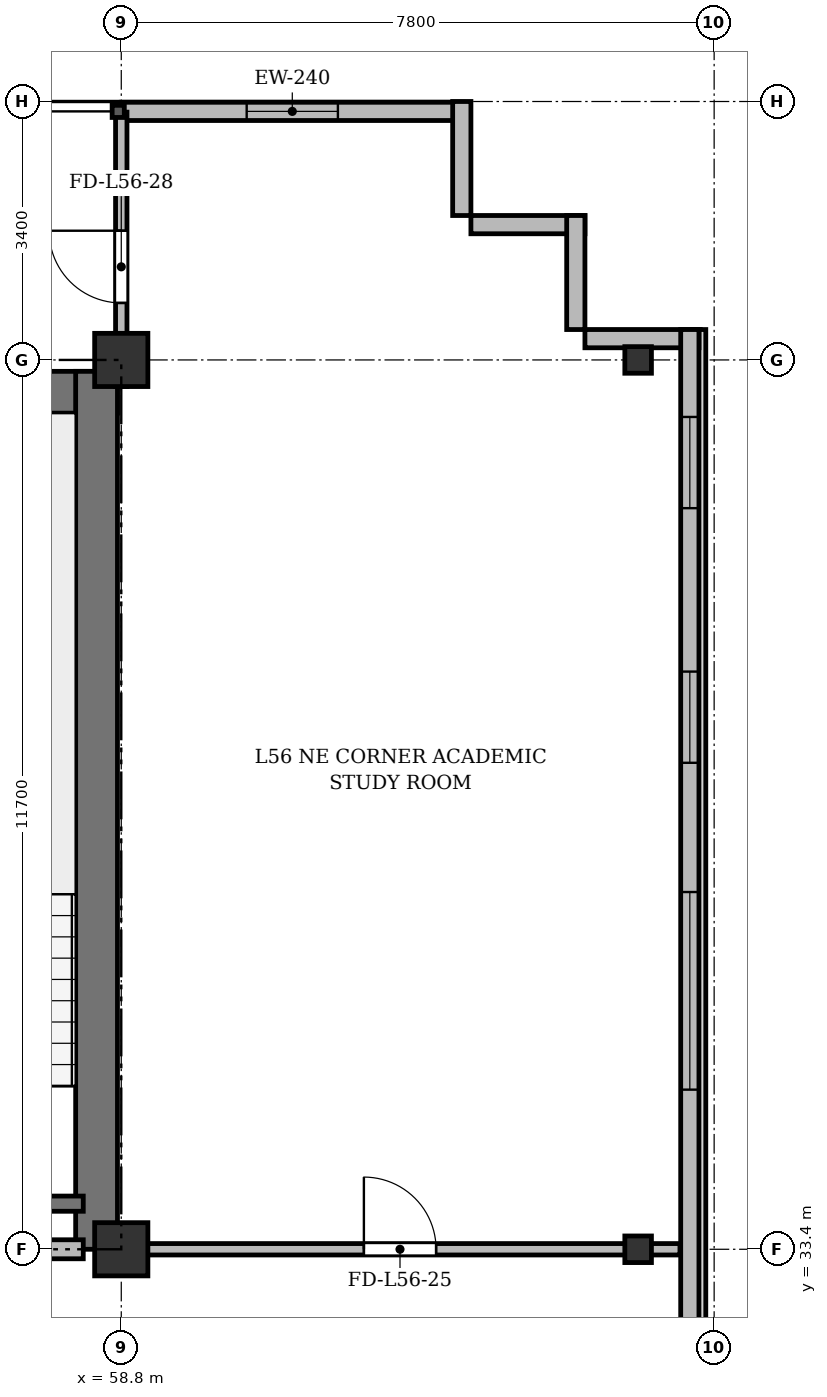
"""IFC4 building model, lengths in metres.
Left out: names, types, materials, properties, quantities, classifications, styles, units other than length and angle.
Written with IfcOpenShell. Run it as: python <this file> out.ifc"""

import sys

from ifc_helpers import new_model, si_unit, direction, frame, frame_2d, origin, origin_2d, place, context, subcontext, project, spatial, rectangle, i_section, extrude, source, transform, mapped, element, fill, save


model = new_model("IFC4")
c1 = context("Model", 3, precision=1e-05, world=origin(), true_north=direction((0.0, 1.0)))
c2 = subcontext(c1, "Body", "Model", "MODEL_VIEW")
j1 = project(units=[si_unit("LENGTHUNIT", "METRE"), si_unit("PLANEANGLEUNIT", "RADIAN")], contexts=[c1])
p1 = place(None, origin())
s1 = spatial("IfcSite", under=j1, at=p1, CompositionType="ELEMENT")
p2 = place(p1, origin())
s2 = spatial("IfcBuilding", under=s1, at=p2, CompositionType="ELEMENT")
p3 = place(p2, frame((0.0, 0.0, 215.7)))
s3 = spatial("IfcBuildingStorey", under=s2, at=p3, CompositionType="ELEMENT", Elevation=215.7)
m1 = source(origin(), c2, "Body", "SweptSolid", [
    extrude(rectangle(XDim=0.7, YDim=0.7, at=origin_2d()), origin(), (0.0, 0.0, 1.0), 3.6),
])
for number, where, z_axis, x_axis in (
    (1, (58.8, 33.4, 0.0), (0.0, 0.0, 1.0), (1.0, 0.0, 0.0)),
    (2, (58.8, 45.1, 0.0), (0.0, 0.0, 1.0), (1.0, 0.0, 0.0)),
):
    element("IfcColumn", number, at=place(p3, frame(where, z_axis=z_axis, x_axis=x_axis)), inside=s3, PredefinedType="COLUMN", context=c2, shape_type="MappedRepresentation", body=[
        mapped(m1, transform((0.0, 0.0, 0.0), x_axis=(1.0, 0.0, 0.0), y_axis=(0.0, 1.0, 0.0), z_axis=(0.0, 0.0, 1.0), scale=1.0)),
    ])
m2 = source(origin(), c2, "Body", "SweptSolid", [
    extrude(i_section(OverallWidth=0.35, OverallDepth=0.35, WebThickness=0.018, FlangeThickness=0.028, at=origin_2d()), origin(), (0.0, 0.0, 1.0), 3.6),
])
for number, where, z_axis, x_axis in (
    (3, (65.6, 33.4, 0.0), (0.0, 0.0, 1.0), (1.0, 0.0, 0.0)),
    (4, (65.6, 45.1, 0.0), (0.0, 0.0, 1.0), (1.0, 0.0, 0.0)),
):
    element("IfcColumn", number, at=place(p3, frame(where, z_axis=z_axis, x_axis=x_axis)), inside=s3, PredefinedType="COLUMN", context=c2, shape_type="MappedRepresentation", body=[
        mapped(m2, transform((0.0, 0.0, 0.0), x_axis=(1.0, 0.0, 0.0), y_axis=(0.0, 1.0, 0.0), z_axis=(0.0, 0.0, 1.0), scale=1.0)),
    ])
p4 = place(p3, frame((58.8, 48.37, 0.0), z_axis=(0.0, 0.0, 1.0), x_axis=(1.0, 0.0, 0.0)))
e5 = element("IfcWall", 5, at=p4, inside=s3, PredefinedType="SOLIDWALL", context=c2, shape_type="SweptSolid", body=[
    extrude(rectangle(XDim=4.5, YDim=0.24, at=frame_2d((2.25, 0.0))), origin(), (0.0, 0.0, 1.0), 3.36),
])
p5 = place(p4, frame((1.65, 0.0, 0.9)))
e6 = element("IfcOpeningElement", 6, at=p5, cuts=e5, PredefinedType="OPENING", context=c2, shape_type="SweptSolid", body=[
    extrude(rectangle(XDim=1.2, YDim=1.65, at=frame_2d((0.6, 0.825))), frame((0.0, 0.13, 0.0), z_axis=(0.0, -1.0, 0.0), x_axis=(1.0, 0.0, 0.0)), (0.0, 0.0, 1.0), 0.26),
])
for number, where, z_axis, x_axis in (
    (7, (63.28, 48.5, 0.0), (0.0, 0.0, 1.0), (0.0, -1.0, 0.0)),
    (8, (63.4, 46.88, 0.0), (0.0, 0.0, 1.0), (1.0, 0.0, 0.0)),
    (9, (64.78, 47.0, 0.0), (0.0, 0.0, 1.0), (0.0, -1.0, 0.0)),
    (10, (64.9, 45.38, 0.0), (0.0, 0.0, 1.0), (1.0, 0.0, 0.0)),
):
    element("IfcWall", number, at=place(p3, frame(where, z_axis=z_axis, x_axis=x_axis)), inside=s3, PredefinedType="SOLIDWALL", context=c2, shape_type="SweptSolid", body=[
        extrude(rectangle(XDim=1.5, YDim=0.24, at=frame_2d((0.75, 0.0))), origin(), (0.0, 0.0, 1.0), 3.36),
    ])
p6 = place(p3, frame((66.28, 45.5, 0.0), z_axis=(0.0, 0.0, 1.0), x_axis=(0.0, -1.0, 0.0)))
e11 = element("IfcWall", 11, at=p6, inside=s3, PredefinedType="SOLIDWALL", context=c2, shape_type="SweptSolid", body=[
    extrude(rectangle(XDim=39.1, YDim=0.24, at=frame_2d((19.55, 0.0))), origin(), (0.0, 0.0, 1.0), 3.36),
])
p7 = place(p6, frame((36.45, 0.0, 0.92)))
e12 = element("IfcOpeningElement", 12, at=p7, cuts=e11, PredefinedType="OPENING", context=c2, shape_type="SweptSolid", body=[
    extrude(rectangle(XDim=1.2, YDim=1.65, at=frame_2d((0.6, 0.825))), frame((0.0, 0.13, 0.0), z_axis=(0.0, -1.0, 0.0), x_axis=(1.0, 0.0, 0.0)), (0.0, 0.0, 1.0), 0.26),
])
p8 = place(p6, frame((32.8, 0.0, 0.92)))
e13 = element("IfcOpeningElement", 13, at=p8, cuts=e11, PredefinedType="OPENING", context=c2, shape_type="SweptSolid", body=[
    extrude(rectangle(XDim=2.6, YDim=1.9, at=frame_2d((1.3, 0.95))), frame((0.0, 0.13, 0.0), z_axis=(0.0, -1.0, 0.0), x_axis=(1.0, 0.0, 0.0)), (0.0, 0.0, 1.0), 0.26),
])
p9 = place(p6, frame((28.6, 0.0, 0.92)))
e14 = element("IfcOpeningElement", 14, at=p9, cuts=e11, PredefinedType="OPENING", context=c2, shape_type="SweptSolid", body=[
    extrude(rectangle(XDim=2.6, YDim=1.9, at=frame_2d((1.3, 0.95))), frame((0.0, 0.13, 0.0), z_axis=(0.0, -1.0, 0.0), x_axis=(1.0, 0.0, 0.0)), (0.0, 0.0, 1.0), 0.26),
])
p10 = place(p6, frame((21.4, 0.0, 0.92)))
e15 = element("IfcOpeningElement", 15, at=p10, cuts=e11, PredefinedType="OPENING", context=c2, shape_type="SweptSolid", body=[
    extrude(rectangle(XDim=2.6, YDim=1.9, at=frame_2d((1.3, 0.95))), frame((0.0, 0.13, 0.0), z_axis=(0.0, -1.0, 0.0), x_axis=(1.0, 0.0, 0.0)), (0.0, 0.0, 1.0), 0.26),
])
p11 = place(p6, frame((7.4, 0.0, 0.92)))
e16 = element("IfcOpeningElement", 16, at=p11, cuts=e11, PredefinedType="OPENING", context=c2, shape_type="SweptSolid", body=[
    extrude(rectangle(XDim=2.6, YDim=1.9, at=frame_2d((1.3, 0.95))), frame((0.0, 0.13, 0.0), z_axis=(0.0, -1.0, 0.0), x_axis=(1.0, 0.0, 0.0)), (0.0, 0.0, 1.0), 0.26),
])
p12 = place(p6, frame((4.5, 0.0, 0.92)))
e17 = element("IfcOpeningElement", 17, at=p12, cuts=e11, PredefinedType="OPENING", context=c2, shape_type="SweptSolid", body=[
    extrude(rectangle(XDim=1.2, YDim=1.65, at=frame_2d((0.6, 0.825))), frame((0.0, 0.13, 0.0), z_axis=(0.0, -1.0, 0.0), x_axis=(1.0, 0.0, 0.0)), (0.0, 0.0, 1.0), 0.26),
])
p13 = place(p6, frame((1.15, 0.0, 0.92)))
e18 = element("IfcOpeningElement", 18, at=p13, cuts=e11, PredefinedType="OPENING", context=c2, shape_type="SweptSolid", body=[
    extrude(rectangle(XDim=1.2, YDim=1.65, at=frame_2d((0.6, 0.825))), frame((0.0, 0.13, 0.0), z_axis=(0.0, -1.0, 0.0), x_axis=(1.0, 0.0, 0.0)), (0.0, 0.0, 1.0), 0.26),
])
p14 = place(p3, frame((15.65, 44.675, 0.0), z_axis=(0.0, 0.0, 1.0), x_axis=(1.0, 0.0, 0.0)))
e19 = element("IfcWall", 19, at=p14, inside=s3, PredefinedType="SHEAR", context=c2, shape_type="SweptSolid", body=[
    extrude(rectangle(XDim=43.1, YDim=0.55, at=frame_2d((21.55, 0.0))), origin(), (0.0, 0.0, 1.0), 3.36),
])
p15 = place(p3, frame((58.475, 33.4, 0.0), z_axis=(0.0, 0.0, 1.0), x_axis=(0.0, 1.0, 0.0)))
e20 = element("IfcWall", 20, at=p15, inside=s3, PredefinedType="SHEAR", context=c2, shape_type="SweptSolid", body=[
    extrude(rectangle(XDim=11.55, YDim=0.55, at=frame_2d((5.775, 0.0))), origin(), (0.0, 0.0, 1.0), 3.36),
])
p16 = place(p3, frame((54.9, 34.0, 0.0), z_axis=(0.0, 0.0, 1.0), x_axis=(1.0, 0.0, 0.0)))
e21 = element("IfcWall", 21, at=p16, inside=s3, PredefinedType="SHEAR", context=c2, shape_type="SweptSolid", body=[
    extrude(rectangle(XDim=3.4, YDim=0.2, at=frame_2d((1.7, 0.0))), origin(), (0.0, 0.0, 1.0), 3.36),
])
p17 = place(p3, frame((47.15, 33.4, 0.0), z_axis=(0.0, 0.0, 1.0), x_axis=(1.0, 0.0, 0.0)))
e22 = element("IfcWall", 22, at=p17, inside=s3, PredefinedType="PARTITIONING", context=c2, shape_type="SweptSolid", body=[
    extrude(rectangle(XDim=11.15, YDim=0.25, at=frame_2d((5.575, 0.0))), origin(), (0.0, 0.0, 1.0), 2.91),
])
p18 = place(p17, frame((0.7, 0.0, 0.0)))
e23 = element("IfcOpeningElement", 23, at=p18, cuts=e22, PredefinedType="OPENING", context=c2, shape_type="SweptSolid", body=[
    extrude(rectangle(XDim=0.95, YDim=2.15, at=frame_2d((0.475, 1.075))), frame((0.0, 0.135, 0.0), z_axis=(0.0, -1.0, 0.0), x_axis=(1.0, 0.0, 0.0)), (0.0, 0.0, 1.0), 0.27),
])
p19 = place(p17, frame((6.0, 0.0, 0.0)))
e24 = element("IfcOpeningElement", 24, at=p19, cuts=e22, PredefinedType="OPENING", context=c2, shape_type="SweptSolid", body=[
    extrude(rectangle(XDim=1.2, YDim=2.15, at=frame_2d((0.6, 1.075))), frame((0.0, 0.135, 0.0), z_axis=(0.0, -1.0, 0.0), x_axis=(1.0, 0.0, 0.0)), (0.0, 0.0, 1.0), 0.27),
])
p20 = place(p3, frame((58.8, 33.4, 0.0), z_axis=(0.0, 0.0, 1.0), x_axis=(1.0, 0.0, 0.0)))
e25 = element("IfcWall", 25, at=p20, inside=s3, PredefinedType="PARTITIONING", context=c2, shape_type="SweptSolid", body=[
    extrude(rectangle(XDim=7.35, YDim=0.15, at=frame_2d((3.675, 0.0))), origin(), (0.0, 0.0, 1.0), 2.91),
])
p21 = place(p20, frame((3.192, 0.0, 0.0)))
e26 = element("IfcOpeningElement", 26, at=p21, cuts=e25, PredefinedType="OPENING", context=c2, shape_type="SweptSolid", body=[
    extrude(rectangle(XDim=0.95, YDim=2.15, at=frame_2d((0.475, 1.075))), frame((0.0, 0.085, 0.0), z_axis=(0.0, -1.0, 0.0), x_axis=(1.0, 0.0, 0.0)), (0.0, 0.0, 1.0), 0.17),
])
p22 = place(p3, frame((58.8, 44.75, 0.0), z_axis=(0.0, 0.0, 1.0), x_axis=(0.0, 1.0, 0.0)))
e27 = element("IfcWall", 27, at=p22, inside=s3, PredefinedType="PARTITIONING", context=c2, shape_type="SweptSolid", body=[
    extrude(rectangle(XDim=3.61, YDim=0.15, at=frame_2d((1.805, 0.0))), origin(), (0.0, 0.0, 1.0), 2.86),
])
p23 = place(p22, frame((1.1, 0.0, 0.0)))
e28 = element("IfcOpeningElement", 28, at=p23, cuts=e27, PredefinedType="OPENING", context=c2, shape_type="SweptSolid", body=[
    extrude(rectangle(XDim=0.95, YDim=2.15, at=frame_2d((0.475, 1.075))), frame((0.0, 0.085, 0.0), z_axis=(0.0, -1.0, 0.0), x_axis=(1.0, 0.0, 0.0)), (0.0, 0.0, 1.0), 0.17),
])
m3 = source(origin(), c2, "Body", "SweptSolid", [
    extrude(rectangle(XDim=1.2, YDim=1.65, at=frame_2d((0.6, 0.825))), frame((0.0, 0.03, 0.0), z_axis=(0.0, -1.0, 0.0), x_axis=(1.0, 0.0, 0.0)), (0.0, 0.0, 1.0), 0.06),
])
p24 = place(p5, origin())
e29 = element("IfcWindow", 29, at=p24, inside=s3, PartitioningType="SINGLE_PANEL", PredefinedType="WINDOW", context=c2, shape_type="MappedRepresentation", body=[
    mapped(m3, transform((0.0, 0.0, 0.0), x_axis=(1.0, 0.0, 0.0), y_axis=(0.0, 1.0, 0.0), z_axis=(0.0, 0.0, 1.0), scale=1.0)),
])
fill(e6, e29)
m4 = source(origin(), c2, "Body", "SweptSolid", [
    extrude(rectangle(XDim=2.6, YDim=1.9, at=frame_2d((1.3, 0.95))), frame((0.0, 0.03, 0.0), z_axis=(0.0, -1.0, 0.0), x_axis=(1.0, 0.0, 0.0)), (0.0, 0.0, 1.0), 0.06),
])
p25 = place(p11, origin())
e30 = element("IfcWindow", 30, at=p25, inside=s3, PartitioningType="SINGLE_PANEL", PredefinedType="WINDOW", context=c2, shape_type="MappedRepresentation", body=[
    mapped(m4, transform((0.0, 0.0, 0.0), x_axis=(1.0, 0.0, 0.0), y_axis=(0.0, 1.0, 0.0), z_axis=(0.0, 0.0, 1.0), scale=1.0)),
])
fill(e16, e30)
p26 = place(p12, origin())
e31 = element("IfcWindow", 31, at=p26, inside=s3, PartitioningType="SINGLE_PANEL", PredefinedType="WINDOW", context=c2, shape_type="MappedRepresentation", body=[
    mapped(m3, transform((0.0, 0.0, 0.0), x_axis=(1.0, 0.0, 0.0), y_axis=(0.0, 1.0, 0.0), z_axis=(0.0, 0.0, 1.0), scale=1.0)),
])
fill(e17, e31)
p27 = place(p13, origin())
e32 = element("IfcWindow", 32, at=p27, inside=s3, PartitioningType="SINGLE_PANEL", PredefinedType="WINDOW", context=c2, shape_type="MappedRepresentation", body=[
    mapped(m3, transform((0.0, 0.0, 0.0), x_axis=(1.0, 0.0, 0.0), y_axis=(0.0, 1.0, 0.0), z_axis=(0.0, 0.0, 1.0), scale=1.0)),
])
fill(e18, e32)
m5 = source(origin(), c2, "Body", "SweptSolid", [
    extrude(rectangle(XDim=0.95, YDim=2.15, at=frame_2d((0.475, 1.075))), frame((0.0, 0.025, 0.0), z_axis=(0.0, -1.0, 0.0), x_axis=(1.0, 0.0, 0.0)), (0.0, 0.0, 1.0), 0.05),
])
p28 = place(p21, origin())
e33 = element("IfcDoor", 33, at=p28, inside=s3, OperationType="SINGLE_SWING_LEFT", PredefinedType="DOOR", context=c2, shape_type="MappedRepresentation", body=[
    mapped(m5, transform((0.0, 0.0, 0.0), x_axis=(1.0, 0.0, 0.0), y_axis=(0.0, 1.0, 0.0), z_axis=(0.0, 0.0, 1.0), scale=1.0)),
])
fill(e26, e33)
p29 = place(p23, origin())
e34 = element("IfcDoor", 34, at=p29, inside=s3, OperationType="SINGLE_SWING_RIGHT", PredefinedType="DOOR", context=c2, shape_type="MappedRepresentation", body=[
    mapped(m5, transform((0.0, 0.0, 0.0), x_axis=(1.0, 0.0, 0.0), y_axis=(0.0, 1.0, 0.0), z_axis=(0.0, 0.0, 1.0), scale=1.0)),
])
fill(e28, e34)
save(model, sys.argv[1])
